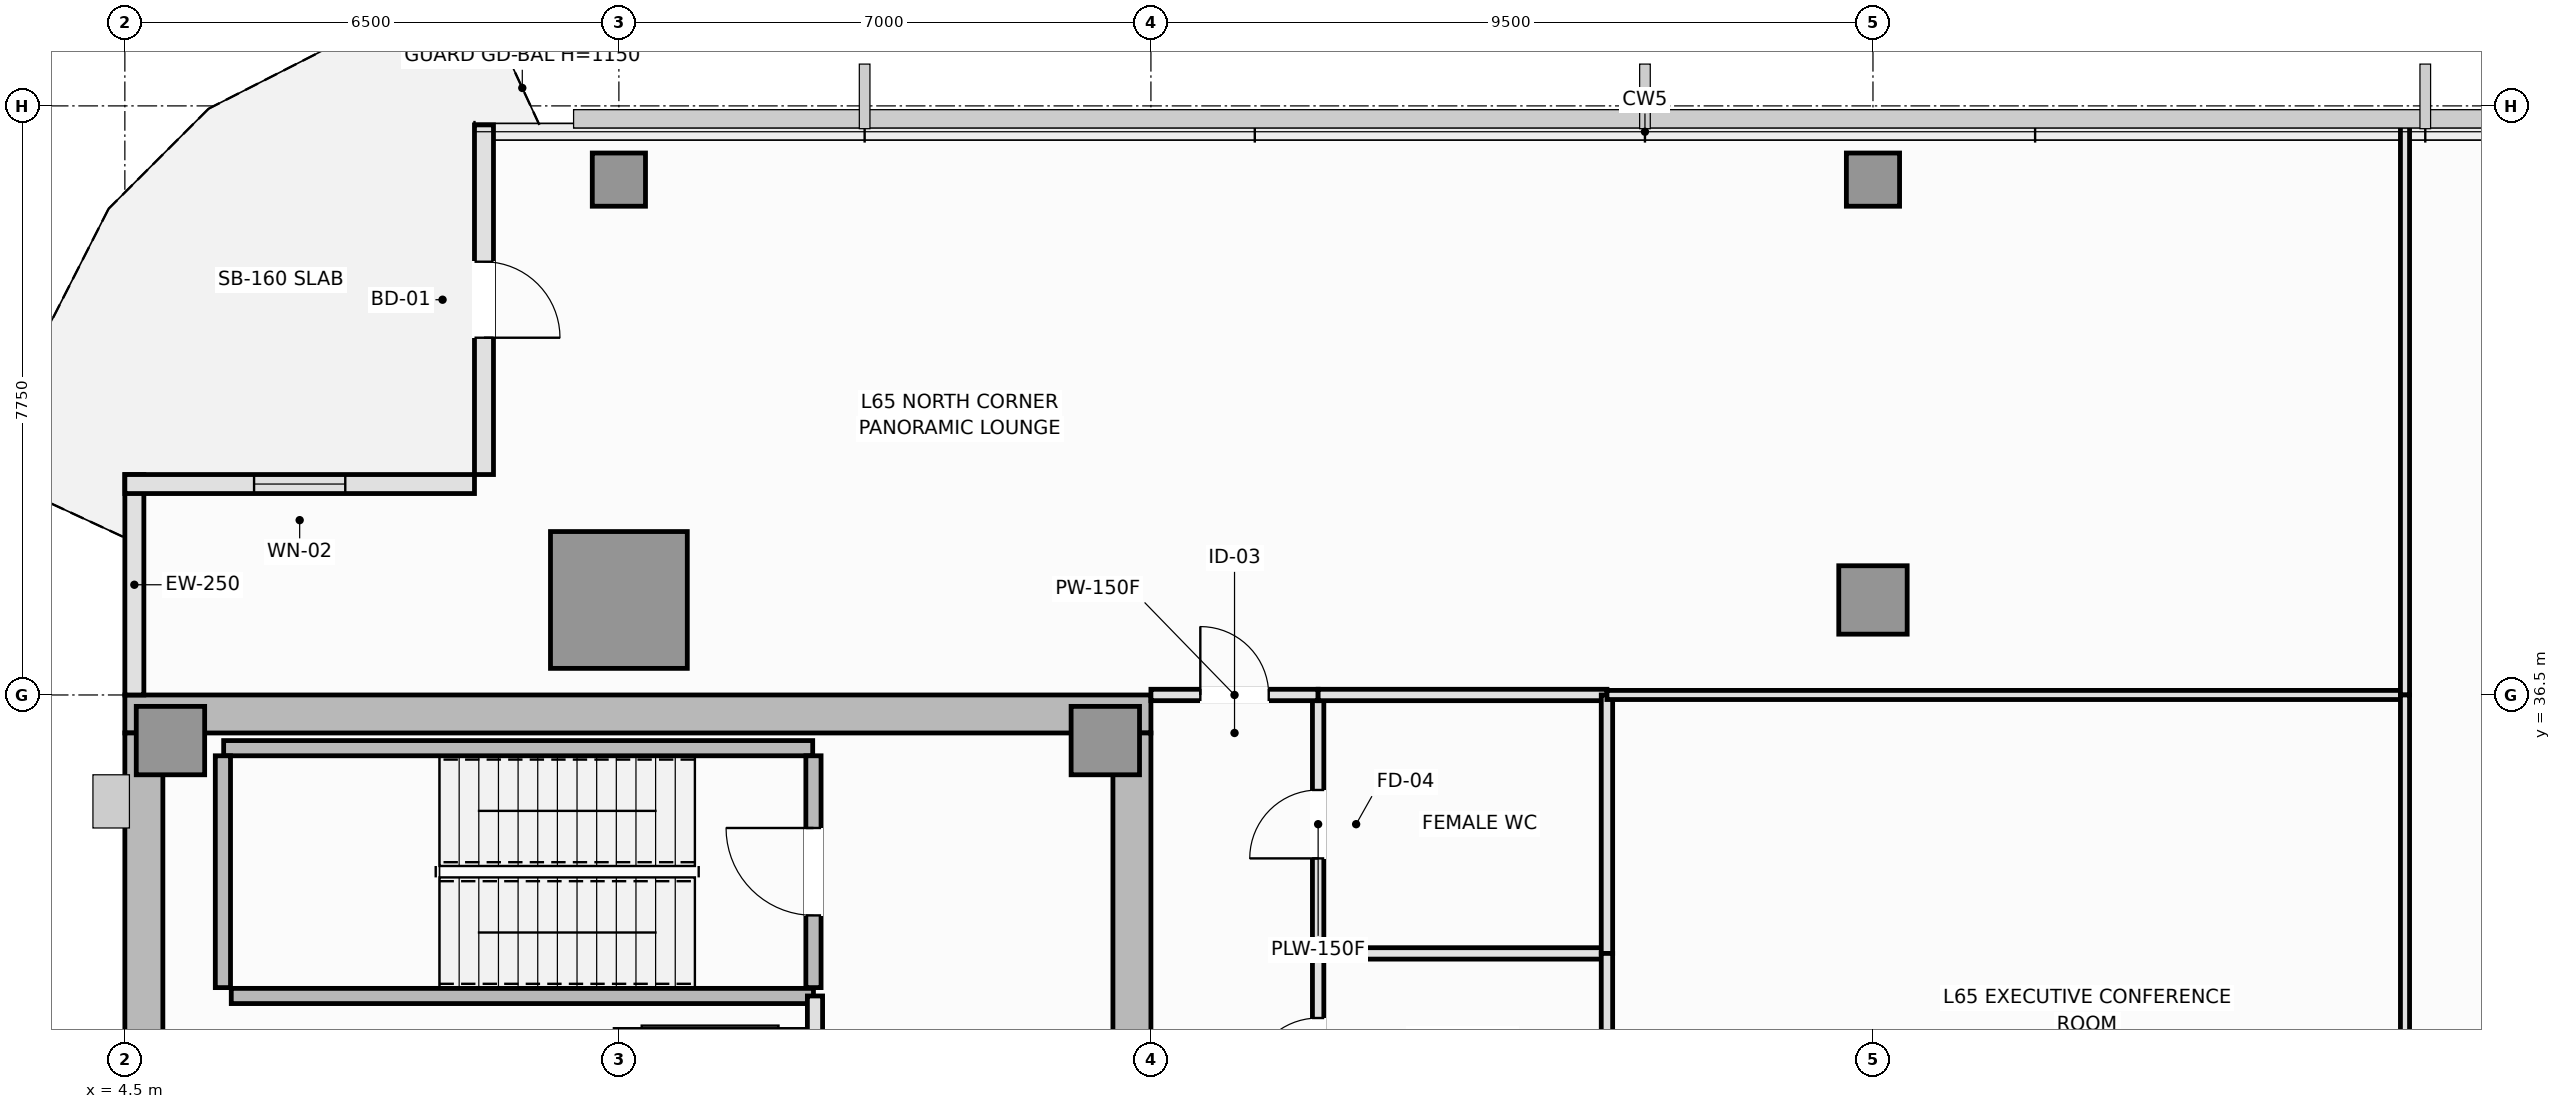
"""IFC4 building model, lengths in metres.
Left out: names, types, materials, properties, quantities, classifications, styles, units other than length and angle.
Written with IfcOpenShell. Run it as: python <this file> out.ifc"""

import sys

from ifc_helpers import new_model, si_unit, direction, frame, frame_2d, origin, origin_2d, place, context, subcontext, project, spatial, rectangle, extrude, element, fill, save


model = new_model("IFC4")
c1 = context("Model", 3, precision=1e-05, world=origin(), true_north=direction((0.0, 1.0)))
c2 = subcontext(c1, "Body", "Model", "MODEL_VIEW")
j1 = project(units=[si_unit("LENGTHUNIT", "METRE"), si_unit("PLANEANGLEUNIT", "RADIAN")], contexts=[c1])
p1 = place(None, origin())
s1 = spatial("IfcSite", under=j1, at=p1, CompositionType="ELEMENT")
p2 = place(p1, origin())
s2 = spatial("IfcBuilding", under=s1, at=p2, CompositionType="ELEMENT")
p3 = place(p2, frame((0.0, 0.0, 244.85)))
s3 = spatial("IfcBuildingStorey", under=s2, at=p3, CompositionType="ELEMENT", Elevation=244.85)
p4 = place(p3, frame((4.5, 36.25, 0.0), z_axis=(0.0, 0.0, 1.0), x_axis=(1.0, 0.0, 0.0)))
e1 = element("IfcWall", 1, at=p4, inside=s3, PredefinedType="SHEAR", context=c2, shape_type="SweptSolid", body=[
    extrude(rectangle(XDim=13.5, YDim=0.5, at=frame_2d((6.75, 0.0))), origin(), (0.0, 0.0, 1.0), 4.4),
])
p5 = place(p3, frame((4.75, 14.5, 0.0), z_axis=(0.0, 0.0, 1.0), x_axis=(0.0, 1.0, 0.0)))
e2 = element("IfcWall", 2, at=p5, inside=s3, PredefinedType="SHEAR", context=c2, shape_type="SweptSolid", body=[
    extrude(rectangle(XDim=21.5, YDim=0.5, at=frame_2d((10.75, 0.0))), origin(), (0.0, 0.0, 1.0), 4.4),
])
p6 = place(p3, frame((17.75, 27.05, 0.0), z_axis=(0.0, 0.0, 1.0), x_axis=(0.0, 1.0, 0.0)))
e3 = element("IfcWall", 3, at=p6, inside=s3, PredefinedType="SHEAR", context=c2, shape_type="SweptSolid", body=[
    extrude(rectangle(XDim=8.95, YDim=0.5, at=frame_2d((4.475, 0.0))), origin(), (0.0, 0.0, 1.0), 4.4),
])
p7 = place(p6, frame((3.45, 0.0, 0.0)))
e4 = element("IfcOpeningElement", 4, at=p7, cuts=e3, PredefinedType="OPENING", context=c2, shape_type="SweptSolid", body=[
    extrude(rectangle(XDim=1.1, YDim=2.15, at=frame_2d((0.55, 1.075))), frame((0.0, 0.26, 0.0), z_axis=(0.0, -1.0, 0.0), x_axis=(1.0, 0.0, 0.0)), (0.0, 0.0, 1.0), 0.52),
])
for number, where, z_axis, x_axis in (
    (5, (5.1, 35.9, 0.0), (0.0, 0.0, 1.0), (1.0, 0.0, 0.0)),
    (6, (17.4, 35.9, 0.0), (0.0, 0.0, 1.0), (1.0, 0.0, 0.0)),
):
    element("IfcColumn", number, at=place(p3, frame(where, z_axis=z_axis, x_axis=x_axis)), inside=s3, PredefinedType="PILASTER", context=c2, shape_type="SweptSolid", body=[
        extrude(rectangle(XDim=0.9, YDim=0.9, at=origin_2d()), origin(), (0.0, 0.0, 1.0), 4.4),
    ])
p8 = place(p3, frame((11.0, 37.75, 0.0), z_axis=(0.0, 0.0, 1.0), x_axis=(1.0, 0.0, 0.0)))
e7 = element("IfcColumn", 7, at=p8, inside=s3, PredefinedType="COLUMN", context=c2, shape_type="SweptSolid", body=[
    extrude(rectangle(XDim=1.8, YDim=1.8, at=origin_2d()), origin(), (0.0, 0.0, 1.0), 4.4),
])
p9 = place(p3, frame((27.5, 37.75, 0.0), z_axis=(0.0, 0.0, 1.0), x_axis=(1.0, 0.0, 0.0)))
e8 = element("IfcColumn", 8, at=p9, inside=s3, PredefinedType="COLUMN", context=c2, shape_type="SweptSolid", body=[
    extrude(rectangle(XDim=0.9, YDim=0.9, at=origin_2d()), origin(), (0.0, 0.0, 1.0), 4.4),
])
for number, where, z_axis, x_axis in (
    (9, (11.0, 43.28, 0.0), (0.0, 0.0, 1.0), (1.0, 0.0, 0.0)),
    (10, (27.5, 43.28, 0.0), (0.0, 0.0, 1.0), (1.0, 0.0, 0.0)),
):
    element("IfcColumn", number, at=place(p3, frame(where, z_axis=z_axis, x_axis=x_axis)), inside=s3, PredefinedType="COLUMN", context=c2, shape_type="SweptSolid", body=[
        extrude(rectangle(XDim=0.7, YDim=0.7, at=origin_2d()), origin(), (0.0, 0.0, 1.0), 4.4),
    ])
p10 = place(p3, frame((4.625, 39.4, 0.0), z_axis=(0.0, 0.0, 1.0), x_axis=(0.0, -1.0, 0.0)))
e11 = element("IfcWall", 11, at=p10, inside=s3, PredefinedType="SOLIDWALL", context=c2, shape_type="SweptSolid", body=[
    extrude(rectangle(XDim=2.9, YDim=0.25, at=frame_2d((1.45, 0.0))), origin(), (0.0, 0.0, 1.0), 4.24),
])
p11 = place(p3, frame((9.225, 44.0, 0.0), z_axis=(0.0, 0.0, 1.0), x_axis=(0.0, -1.0, 0.0)))
e12 = element("IfcWall", 12, at=p11, inside=s3, PredefinedType="SOLIDWALL", context=c2, shape_type="SweptSolid", body=[
    extrude(rectangle(XDim=4.6, YDim=0.25, at=frame_2d((2.3, 0.0))), origin(), (0.0, 0.0, 1.0), 4.24),
])
p12 = place(p11, frame((1.8, 0.0, 0.0)))
e13 = element("IfcOpeningElement", 13, at=p12, cuts=e12, PredefinedType="OPENING", context=c2, shape_type="SweptSolid", body=[
    extrude(rectangle(XDim=1.0, YDim=2.2, at=frame_2d((0.5, 1.1))), frame((0.0, 0.135, 0.0), z_axis=(0.0, -1.0, 0.0), x_axis=(1.0, 0.0, 0.0)), (0.0, 0.0, 1.0), 0.27),
])
p13 = place(p3, frame((9.1, 39.275, 0.0), z_axis=(0.0, 0.0, 1.0), x_axis=(-1.0, 0.0, 0.0)))
e14 = element("IfcWall", 14, at=p13, inside=s3, PredefinedType="SOLIDWALL", context=c2, shape_type="SweptSolid", body=[
    extrude(rectangle(XDim=4.6, YDim=0.25, at=frame_2d((2.3, 0.0))), origin(), (0.0, 0.0, 1.0), 3.97),
])
p14 = place(p13, frame((1.7, 0.0, 0.9)))
e15 = element("IfcOpeningElement", 15, at=p14, cuts=e14, PredefinedType="OPENING", context=c2, shape_type="SweptSolid", body=[
    extrude(rectangle(XDim=1.2, YDim=1.8, at=frame_2d((0.6, 0.9))), frame((0.0, 0.135, 0.0), z_axis=(0.0, -1.0, 0.0), x_axis=(1.0, 0.0, 0.0)), (0.0, 0.0, 1.0), 0.27),
])
p15 = place(p3, frame((5.8, 35.8, 0.0), z_axis=(0.0, 0.0, 1.0), x_axis=(1.0, 0.0, 0.0)))
e16 = element("IfcWall", 16, at=p15, inside=s3, PredefinedType="SOLIDWALL", context=c2, shape_type="SweptSolid", body=[
    extrude(rectangle(XDim=7.75, YDim=0.2, at=frame_2d((3.875, 0.0))), origin(), (0.0, 0.0, 1.0), 4.4),
])
p16 = place(p3, frame((5.79, 32.65, 0.0), z_axis=(0.0, 0.0, 1.0), x_axis=(0.0, 1.0, 0.0)))
e17 = element("IfcWall", 17, at=p16, inside=s3, PredefinedType="SOLIDWALL", context=c2, shape_type="SweptSolid", body=[
    extrude(rectangle(XDim=3.05, YDim=0.2, at=frame_2d((1.525, 0.0))), origin(), (0.0, 0.0, 1.0), 4.4),
])
p17 = place(p3, frame((5.9, 32.54, 0.0), z_axis=(0.0, 0.0, 1.0), x_axis=(1.0, 0.0, 0.0)))
e18 = element("IfcWall", 18, at=p17, inside=s3, PredefinedType="SOLIDWALL", context=c2, shape_type="SweptSolid", body=[
    extrude(rectangle(XDim=7.66, YDim=0.2, at=frame_2d((3.83, 0.0))), origin(), (0.0, 0.0, 1.0), 4.4),
])
p18 = place(p3, frame((13.56, 32.65, 0.0), z_axis=(0.0, 0.0, 1.0), x_axis=(0.0, 1.0, 0.0)))
e19 = element("IfcWall", 19, at=p18, inside=s3, PredefinedType="SOLIDWALL", context=c2, shape_type="SweptSolid", body=[
    extrude(rectangle(XDim=3.05, YDim=0.2, at=frame_2d((1.525, 0.0))), origin(), (0.0, 0.0, 1.0), 4.4),
])
p19 = place(p18, frame((0.95, 0.0, 0.0)))
e20 = element("IfcOpeningElement", 20, at=p19, cuts=e19, PredefinedType="OPENING", context=c2, shape_type="SweptSolid", body=[
    extrude(rectangle(XDim=1.15, YDim=2.15, at=frame_2d((0.575, 1.075))), frame((0.0, 0.11, 0.0), z_axis=(0.0, -1.0, 0.0), x_axis=(1.0, 0.0, 0.0)), (0.0, 0.0, 1.0), 0.22),
])
p20 = place(p3, frame((13.58, 32.0, 0.0), z_axis=(0.0, 0.0, 1.0), x_axis=(0.0, 1.0, 0.0)))
e21 = element("IfcWall", 21, at=p20, inside=s3, PredefinedType="PARTITIONING", context=c2, shape_type="SweptSolid", body=[
    extrude(rectangle(XDim=0.54, YDim=0.2, at=frame_2d((0.27, 0.0))), origin(), (0.0, 0.0, 1.0), 4.24),
])
p21 = place(p3, frame((20.2, 33.1, 0.0), z_axis=(0.0, 0.0, 1.0), x_axis=(0.0, 1.0, 0.0)))
e22 = element("IfcWall", 22, at=p21, inside=s3, PredefinedType="PLUMBINGWALL", context=c2, shape_type="SweptSolid", body=[
    extrude(rectangle(XDim=3.4, YDim=0.15, at=frame_2d((1.7, 0.0))), origin(), (0.0, 0.0, 1.0), 4.24),
])
p22 = place(p21, frame((1.25, 0.0, 0.0)))
e23 = element("IfcOpeningElement", 23, at=p22, cuts=e22, PredefinedType="OPENING", context=c2, shape_type="SweptSolid", body=[
    extrude(rectangle(XDim=0.9, YDim=2.1, at=frame_2d((0.45, 1.05))), frame((0.0, 0.085, 0.0), z_axis=(0.0, -1.0, 0.0), x_axis=(1.0, 0.0, 0.0)), (0.0, 0.0, 1.0), 0.17),
])
p23 = place(p3, frame((20.2, 30.5, 0.0), z_axis=(0.0, 0.0, 1.0), x_axis=(0.0, 1.0, 0.0)))
e24 = element("IfcWall", 24, at=p23, inside=s3, PredefinedType="PLUMBINGWALL", context=c2, shape_type="SweptSolid", body=[
    extrude(rectangle(XDim=2.6, YDim=0.15, at=frame_2d((1.3, 0.0))), origin(), (0.0, 0.0, 1.0), 4.24),
])
p24 = place(p23, frame((0.85, 0.0, 0.0)))
e25 = element("IfcOpeningElement", 25, at=p24, cuts=e24, PredefinedType="OPENING", context=c2, shape_type="SweptSolid", body=[
    extrude(rectangle(XDim=0.9, YDim=2.1, at=frame_2d((0.45, 1.05))), frame((0.0, 0.085, 0.0), z_axis=(0.0, -1.0, 0.0), x_axis=(1.0, 0.0, 0.0)), (0.0, 0.0, 1.0), 0.17),
])
p25 = place(p3, frame((18.0, 36.5, 0.0), z_axis=(0.0, 0.0, 1.0), x_axis=(1.0, 0.0, 0.0)))
e26 = element("IfcWall", 26, at=p25, inside=s3, PredefinedType="PARTITIONING", context=c2, shape_type="SweptSolid", body=[
    extrude(rectangle(XDim=2.2, YDim=0.15, at=frame_2d((1.1, 0.0))), origin(), (0.0, 0.0, 1.0), 4.24),
])
p26 = place(p25, frame((0.65, 0.0, 0.0)))
e27 = element("IfcOpeningElement", 27, at=p26, cuts=e26, PredefinedType="OPENING", context=c2, shape_type="SweptSolid", body=[
    extrude(rectangle(XDim=0.9, YDim=2.1, at=frame_2d((0.45, 1.05))), frame((0.0, 0.085, 0.0), z_axis=(0.0, -1.0, 0.0), x_axis=(1.0, 0.0, 0.0)), (0.0, 0.0, 1.0), 0.17),
])
for number, where, z_axis, x_axis in (
    (28, (20.2, 33.1, 0.0), (0.0, 0.0, 1.0), (1.0, 0.0, 0.0)),
    (29, (20.2, 36.5, 0.0), (0.0, 0.0, 1.0), (1.0, 0.0, 0.0)),
):
    element("IfcWall", number, at=place(p3, frame(where, z_axis=z_axis, x_axis=x_axis)), inside=s3, PredefinedType="PLUMBINGWALL", context=c2, shape_type="SweptSolid", body=[
        extrude(rectangle(XDim=3.8, YDim=0.15, at=frame_2d((1.9, 0.0))), origin(), (0.0, 0.0, 1.0), 4.24),
    ])
p27 = place(p3, frame((24.0, 33.1, 0.0), z_axis=(0.0, 0.0, 1.0), x_axis=(0.0, 1.0, 0.0)))
e30 = element("IfcWall", 30, at=p27, inside=s3, PredefinedType="PLUMBINGWALL", context=c2, shape_type="SweptSolid", body=[
    extrude(rectangle(XDim=3.4, YDim=0.15, at=frame_2d((1.7, 0.0))), origin(), (0.0, 0.0, 1.0), 4.24),
])
p28 = place(p3, frame((24.0, 30.5, 0.0), z_axis=(0.0, 0.0, 1.0), x_axis=(0.0, 1.0, 0.0)))
e31 = element("IfcWall", 31, at=p28, inside=s3, PredefinedType="PLUMBINGWALL", context=c2, shape_type="SweptSolid", body=[
    extrude(rectangle(XDim=2.6, YDim=0.15, at=frame_2d((1.3, 0.0))), origin(), (0.0, 0.0, 1.0), 4.24),
])
p29 = place(p3, frame((24.0, 36.5, 0.0), z_axis=(0.0, 0.0, 1.0), x_axis=(1.0, 0.0, 0.0)))
e32 = element("IfcWall", 32, at=p29, inside=s3, PredefinedType="PARTITIONING", context=c2, shape_type="SweptSolid", body=[
    extrude(rectangle(XDim=10.5, YDim=0.12, at=frame_2d((5.25, 0.0))), origin(), (0.0, 0.0, 1.0), 4.24),
])
p30 = place(p3, frame((34.5, 36.5, 0.0), z_axis=(0.0, 0.0, 1.0), x_axis=(0.0, 1.0, 0.0)))
e33 = element("IfcWall", 33, at=p30, inside=s3, PredefinedType="PARTITIONING", context=c2, shape_type="SweptSolid", body=[
    extrude(rectangle(XDim=7.49, YDim=0.12, at=frame_2d((3.745, 0.0))), origin(), (0.0, 0.0, 1.0), 3.91),
])
p31 = place(p3, frame((34.5, 26.7, 0.0), z_axis=(0.0, 0.0, 1.0), x_axis=(0.0, 1.0, 0.0)))
e34 = element("IfcWall", 34, at=p31, inside=s3, PredefinedType="PARTITIONING", context=c2, shape_type="SweptSolid", body=[
    extrude(rectangle(XDim=9.8, YDim=0.12, at=frame_2d((4.9, 0.0))), origin(), (0.0, 0.0, 1.0), 4.24),
])
p32 = place(p12, frame((1.0, 0.0, 0.0), z_axis=(0.0, 0.0, 1.0), x_axis=(-1.0, 0.0, 0.0)))
e35 = element("IfcDoor", 35, at=p32, inside=s3, OperationType="SINGLE_SWING_RIGHT", PredefinedType="DOOR", context=c2, shape_type="SweptSolid", body=[
    extrude(rectangle(XDim=1.0, YDim=2.2, at=frame_2d((0.5, 1.1))), frame((0.0, 0.025, 0.0), z_axis=(0.0, -1.0, 0.0), x_axis=(1.0, 0.0, 0.0)), (0.0, 0.0, 1.0), 0.05),
])
fill(e13, e35)
p33 = place(p14, origin())
e36 = element("IfcWindow", 36, at=p33, inside=s3, PartitioningType="SINGLE_PANEL", PredefinedType="WINDOW", context=c2, shape_type="SweptSolid", body=[
    extrude(rectangle(XDim=1.2, YDim=1.8, at=frame_2d((0.6, 0.9))), frame((0.0, 0.03, 0.0), z_axis=(0.0, -1.0, 0.0), x_axis=(1.0, 0.0, 0.0)), (0.0, 0.0, 1.0), 0.06),
])
fill(e15, e36)
p34 = place(p19, origin())
e37 = element("IfcDoor", 37, at=p34, inside=s3, OperationType="SINGLE_SWING_RIGHT", PredefinedType="DOOR", context=c2, shape_type="SweptSolid", body=[
    extrude(rectangle(XDim=1.15, YDim=2.15, at=frame_2d((0.575, 1.075))), frame((0.0, 0.025, 0.0), z_axis=(0.0, -1.0, 0.0), x_axis=(1.0, 0.0, 0.0)), (0.0, 0.0, 1.0), 0.05),
])
fill(e20, e37)
p35 = place(p22, origin())
e38 = element("IfcDoor", 38, at=p35, inside=s3, OperationType="SINGLE_SWING_LEFT", PredefinedType="DOOR", context=c2, shape_type="SweptSolid", body=[
    extrude(rectangle(XDim=0.9, YDim=2.1, at=frame_2d((0.45, 1.05))), frame((0.0, 0.025, 0.0), z_axis=(0.0, -1.0, 0.0), x_axis=(1.0, 0.0, 0.0)), (0.0, 0.0, 1.0), 0.05),
])
fill(e23, e38)
p36 = place(p24, origin())
e39 = element("IfcDoor", 39, at=p36, inside=s3, OperationType="SINGLE_SWING_LEFT", PredefinedType="DOOR", context=c2, shape_type="SweptSolid", body=[
    extrude(rectangle(XDim=0.9, YDim=2.1, at=frame_2d((0.45, 1.05))), frame((0.0, 0.025, 0.0), z_axis=(0.0, -1.0, 0.0), x_axis=(1.0, 0.0, 0.0)), (0.0, 0.0, 1.0), 0.05),
])
fill(e25, e39)
p37 = place(p26, origin())
e40 = element("IfcDoor", 40, at=p37, inside=s3, OperationType="SINGLE_SWING_LEFT", PredefinedType="DOOR", context=c2, shape_type="SweptSolid", body=[
    extrude(rectangle(XDim=0.9, YDim=2.1, at=frame_2d((0.45, 1.05))), frame((0.0, 0.025, 0.0), z_axis=(0.0, -1.0, 0.0), x_axis=(1.0, 0.0, 0.0)), (0.0, 0.0, 1.0), 0.05),
])
fill(e27, e40)
save(model, sys.argv[1])
